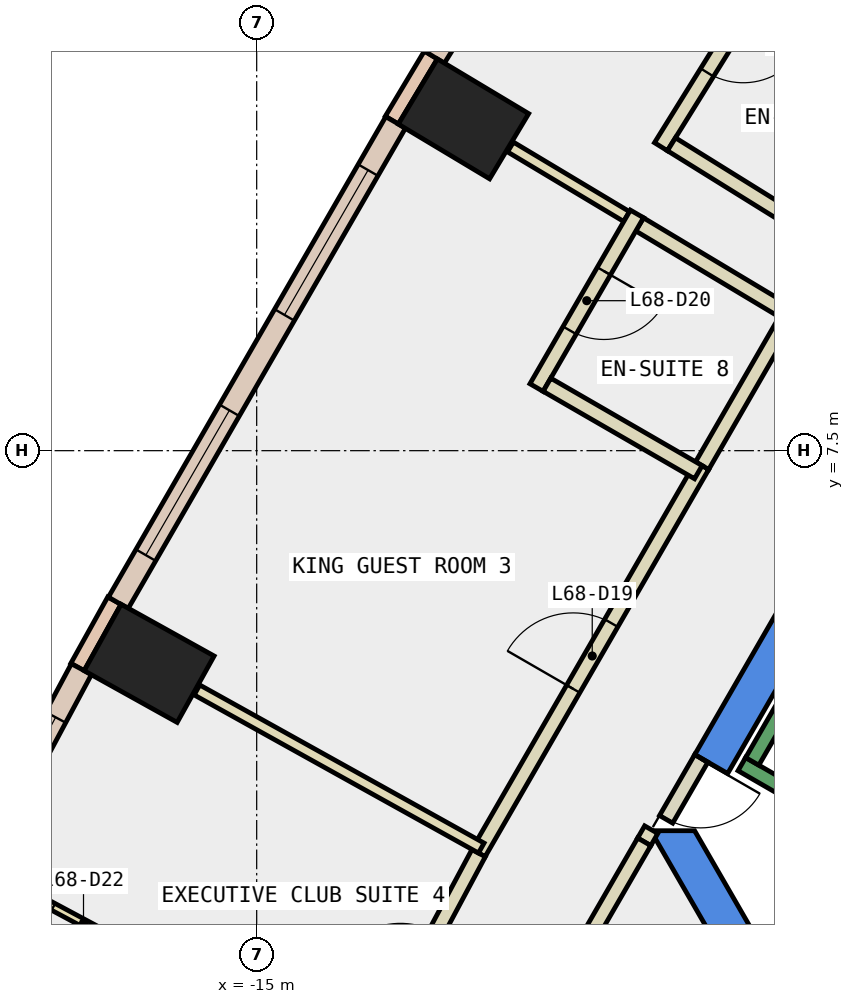
"""IFC4 building model, lengths in metres.
Left out: names, types, materials, properties, quantities, classifications, styles, units other than length and angle.
Written with IfcOpenShell. Run it as: python <this file> out.ifc"""

import sys

from ifc_helpers import new_model, si_unit, direction, frame, frame_2d, origin, origin_2d, place, context, subcontext, project, spatial, polyline, rectangle, outline, extrude, element, fill, save


model = new_model("IFC4")
c1 = context("Model", 3, precision=1e-05, world=origin(), true_north=direction((0.0, 1.0)))
c2 = subcontext(c1, "Body", "Model", "MODEL_VIEW")
j1 = project(units=[si_unit("LENGTHUNIT", "METRE"), si_unit("PLANEANGLEUNIT", "RADIAN")], contexts=[c1])
p1 = place(None, origin())
s1 = spatial("IfcSite", under=j1, at=p1, CompositionType="ELEMENT")
p2 = place(p1, origin())
s2 = spatial("IfcBuilding", under=s1, at=p2, CompositionType="ELEMENT")
p3 = place(p2, frame((0.0, 0.0, 293.6)))
s3 = spatial("IfcBuildingStorey", under=s2, at=p3, CompositionType="ELEMENT", Elevation=293.6)
for number, where, z_axis, x_axis in (
    (1, (-12.279, 11.865, -0.34), (0.0, 0.0, 1.0), (0.514, 0.858, 0.0)),
    (2, (-16.415, 4.702, -0.34), (0.0, 0.0, 1.0), (0.486, 0.874, 0.0)),
):
    element("IfcColumn", number, at=place(p3, frame(where, z_axis=z_axis, x_axis=x_axis)), inside=s3, PredefinedType="COLUMN", context=c2, shape_type="SweptSolid", body=[
        extrude(rectangle(XDim=1.0, YDim=1.4, at=origin_2d()), origin(), (0.0, 0.0, 1.0), 3.6),
    ])
p4 = place(p3, frame((0.0, 0.0, -0.34)))
e3 = element("IfcWall", 3, at=p4, inside=s3, PredefinedType="SHEAR", context=c2, shape_type="SweptSolid", body=[
    extrude(outline(polyline([(-9.236, 3.502), (-8.803, 3.253), (-4.619, 10.5), (-4.907, 11.0), (-9.236, 3.502)])), origin(), (0.0, 0.0, 1.0), 3.6),
])
p5 = place(p3, frame((0.0, 0.0, -0.34)))
e4 = element("IfcWall", 4, at=p5, inside=s3, PredefinedType="SHEAR", context=c2, shape_type="SweptSolid", body=[
    extrude(outline(polyline([(-9.815, 2.5), (-4.907, -6.0), (-4.619, -5.5), (-9.238, 2.5), (-9.815, 2.5)])), origin(), (0.0, 0.0, 1.0), 3.6),
])
p6 = place(p3, frame((-12.708, 12.706, 0.0), z_axis=(0.0, 0.0, 1.0), x_axis=(-0.513777707721, -0.857923345672, 0.0)))
e5 = element("IfcWall", 5, at=p6, inside=s3, PredefinedType="STANDARD", context=c2, shape_type="SweptSolid", body=[
    extrude(rectangle(XDim=1.0, YDim=0.2, at=frame_2d((0.5, 0.0))), origin(), (0.0, 0.0, 1.0), 3.26),
])
p7 = place(p3, frame((-16.872, 5.527, 0.0), z_axis=(0.0, 0.0, 1.0), x_axis=(-0.485850211157, -0.874042088414, 0.0)))
e6 = element("IfcWall", 6, at=p7, inside=s3, PredefinedType="STANDARD", context=c2, shape_type="SweptSolid", body=[
    extrude(rectangle(XDim=1.0, YDim=0.2, at=frame_2d((0.5, 0.0))), origin(), (0.0, 0.0, 1.0), 3.26),
])
p8 = place(p3, frame((-8.819, 18.855, 0.0), z_axis=(0.0, 0.0, 1.0), x_axis=(-0.527762071678, -0.849392250788, 0.0)))
e7 = element("IfcWall", 7, at=p8, inside=s3, PredefinedType="STANDARD", context=c2, shape_type="SweptSolid", body=[
    extrude(rectangle(XDim=7.276, YDim=0.3, at=frame_2d((3.638, 0.0))), origin(), (0.0, 0.0, 1.0), 3.26),
])
p9 = place(p8, frame((0.719, 0.0, 0.9)))
e8 = element("IfcOpeningElement", 8, at=p9, cuts=e7, PredefinedType="OPENING", context=c2, shape_type="SweptSolid", body=[
    extrude(rectangle(XDim=2.2, YDim=2.0, at=frame_2d((1.1, 1.0))), frame((0.0, 0.16, 0.0), z_axis=(0.0, -1.0, 0.0), x_axis=(1.0, 0.0, 0.0)), (0.0, 0.0, 1.0), 0.32),
])
p10 = place(p8, frame((4.357, 0.0, 0.9)))
e9 = element("IfcOpeningElement", 9, at=p10, cuts=e7, PredefinedType="OPENING", context=c2, shape_type="SweptSolid", body=[
    extrude(rectangle(XDim=2.2, YDim=2.0, at=frame_2d((1.1, 1.0))), frame((0.0, 0.16, 0.0), z_axis=(0.0, -1.0, 0.0), x_axis=(1.0, 0.0, 0.0)), (0.0, 0.0, 1.0), 0.32),
])
p11 = place(p3, frame((-13.172, 11.819, 0.0), z_axis=(0.0, 0.0, 1.0), x_axis=(-0.499945412946, -0.866056917341, 0.0)))
e10 = element("IfcWall", 10, at=p11, inside=s3, PredefinedType="STANDARD", context=c2, shape_type="SweptSolid", body=[
    extrude(rectangle(XDim=7.299, YDim=0.3, at=frame_2d((3.649, 0.0))), origin(), (0.0, 0.0, 1.0), 3.26),
])
p12 = place(p11, frame((0.725, 0.0, 0.9)))
e11 = element("IfcOpeningElement", 11, at=p12, cuts=e10, PredefinedType="OPENING", context=c2, shape_type="SweptSolid", body=[
    extrude(rectangle(XDim=2.2, YDim=2.0, at=frame_2d((1.1, 1.0))), frame((0.0, 0.16, 0.0), z_axis=(0.0, -1.0, 0.0), x_axis=(1.0, 0.0, 0.0)), (0.0, 0.0, 1.0), 0.32),
])
p13 = place(p11, frame((4.374, 0.0, 0.9)))
e12 = element("IfcOpeningElement", 12, at=p13, cuts=e10, PredefinedType="OPENING", context=c2, shape_type="SweptSolid", body=[
    extrude(rectangle(XDim=2.2, YDim=2.0, at=frame_2d((1.1, 1.0))), frame((0.0, 0.16, 0.0), z_axis=(0.0, -1.0, 0.0), x_axis=(1.0, 0.0, 0.0)), (0.0, 0.0, 1.0), 0.32),
])
p14 = place(p3, frame((-17.306, 4.626, 0.0), z_axis=(0.0, 0.0, 1.0), x_axis=(-0.471789353675, -0.881711293882, 0.0)))
e13 = element("IfcWall", 13, at=p14, inside=s3, PredefinedType="STANDARD", context=c2, shape_type="SweptSolid", body=[
    extrude(rectangle(XDim=7.277, YDim=0.3, at=frame_2d((3.638, 0.0))), origin(), (0.0, 0.0, 1.0), 3.26),
])
p15 = place(p14, frame((0.719, 0.0, 0.9)))
e14 = element("IfcOpeningElement", 14, at=p15, cuts=e13, PredefinedType="OPENING", context=c2, shape_type="SweptSolid", body=[
    extrude(rectangle(XDim=2.2, YDim=2.0, at=frame_2d((1.1, 1.0))), frame((0.0, 0.16, 0.0), z_axis=(0.0, -1.0, 0.0), x_axis=(1.0, 0.0, 0.0)), (0.0, 0.0, 1.0), 0.32),
])
p16 = place(p14, frame((4.358, 0.0, 0.9)))
e15 = element("IfcOpeningElement", 15, at=p16, cuts=e13, PredefinedType="OPENING", context=c2, shape_type="SweptSolid", body=[
    extrude(rectangle(XDim=2.2, YDim=2.0, at=frame_2d((1.1, 1.0))), frame((0.0, 0.16, 0.0), z_axis=(0.0, -1.0, 0.0), x_axis=(1.0, 0.0, 0.0)), (0.0, 0.0, 1.0), 0.32),
])
p17 = place(p3, frame((-9.809, 2.514, 0.0), z_axis=(0.0, 0.0, 1.0), x_axis=(-0.497849076449, -0.867263683708, 0.0)))
e16 = element("IfcWall", 16, at=p17, inside=s3, PredefinedType="PARTITIONING", context=c2, shape_type="SweptSolid", body=[
    extrude(rectangle(XDim=0.184, YDim=0.2, at=frame_2d((0.092, 0.0))), origin(), (0.0, 0.0, 1.0), 2.4),
])
p18 = place(p3, frame((-12.082, 2.207, 0.0), z_axis=(0.0, 0.0, 1.0), x_axis=(0.500123454404, 0.865954115618, 0.0)))
e17 = element("IfcWall", 17, at=p18, inside=s3, PredefinedType="PARTITIONING", context=c2, shape_type="SweptSolid", body=[
    extrude(rectangle(XDim=5.885, YDim=0.2, at=frame_2d((2.942, 0.0))), origin(), (0.0, 0.0, 1.0), 3.26),
])
p19 = place(p18, frame((2.493, 0.0, 0.0)))
e18 = element("IfcOpeningElement", 18, at=p19, cuts=e17, PredefinedType="OPENING", context=c2, shape_type="SweptSolid", body=[
    extrude(rectangle(XDim=1.0, YDim=2.1, at=frame_2d((0.5, 1.05))), frame((0.0, 0.11, 0.0), z_axis=(0.0, -1.0, 0.0), x_axis=(1.0, 0.0, 0.0)), (0.0, 0.0, 1.0), 0.22),
])
p20 = place(p3, frame((-9.139, 7.303, 0.0), z_axis=(0.0, 0.0, 1.0), x_axis=(0.499869187296, 0.866100915363, 0.0)))
e19 = element("IfcWall", 19, at=p20, inside=s3, PredefinedType="PARTITIONING", context=c2, shape_type="SweptSolid", body=[
    extrude(rectangle(XDim=2.401, YDim=0.2, at=frame_2d((1.2, 0.0))), origin(), (0.0, 0.0, 1.0), 3.26),
])
p21 = place(p3, frame((-13.666, -0.76, 0.0), z_axis=(0.0, 0.0, 1.0), x_axis=(0.471643060173, 0.881789557543, 0.0)))
e20 = element("IfcWall", 20, at=p21, inside=s3, PredefinedType="PARTITIONING", context=c2, shape_type="SweptSolid", body=[
    extrude(rectangle(XDim=3.363, YDim=0.2, at=frame_2d((1.681, 0.0))), origin(), (0.0, 0.0, 1.0), 3.26),
])
p22 = place(p21, frame((1.181, 0.0, 0.0)))
e21 = element("IfcOpeningElement", 21, at=p22, cuts=e20, PredefinedType="OPENING", context=c2, shape_type="SweptSolid", body=[
    extrude(rectangle(XDim=1.0, YDim=2.1, at=frame_2d((0.5, 1.05))), frame((0.0, 0.11, 0.0), z_axis=(0.0, -1.0, 0.0), x_axis=(1.0, 0.0, 0.0)), (0.0, 0.0, 1.0), 0.22),
])
p23 = place(p3, frame((-7.992, 14.217, 0.0), z_axis=(0.0, 0.0, 1.0), x_axis=(-0.527795797674, -0.849371294522, 0.0)))
e22 = element("IfcWall", 22, at=p23, inside=s3, PredefinedType="PARTITIONING", context=c2, shape_type="SweptSolid", body=[
    extrude(rectangle(XDim=3.2, YDim=0.2, at=frame_2d((1.6, 0.0))), origin(), (0.0, 0.0, 1.0), 3.26),
])
p24 = place(p23, frame((1.15, 0.0, 0.0)))
e23 = element("IfcOpeningElement", 23, at=p24, cuts=e22, PredefinedType="OPENING", context=c2, shape_type="SweptSolid", body=[
    extrude(rectangle(XDim=0.9, YDim=2.1, at=frame_2d((0.45, 1.05))), frame((0.0, 0.11, 0.0), z_axis=(0.0, -1.0, 0.0), x_axis=(1.0, 0.0, 0.0)), (0.0, 0.0, 1.0), 0.22),
])
p25 = place(p3, frame((-9.543, 11.531, 0.0), z_axis=(0.0, 0.0, 1.0), x_axis=(0.849400119549, -0.527749407305, 0.0)))
e24 = element("IfcWall", 24, at=p25, inside=s3, PredefinedType="PARTITIONING", context=c2, shape_type="SweptSolid", body=[
    extrude(rectangle(XDim=2.5, YDim=0.2, at=frame_2d((1.25, 0.0))), origin(), (0.0, 0.0, 1.0), 3.26),
])
p26 = place(p3, frame((-10.133, 10.58, 0.0), z_axis=(0.0, 0.0, 1.0), x_axis=(-0.857903919212, 0.513810145287, 0.0)))
e25 = element("IfcWall", 25, at=p26, inside=s3, PredefinedType="PARTITIONING", context=c2, shape_type="SweptSolid", body=[
    extrude(rectangle(XDim=1.781, YDim=0.15, at=frame_2d((0.891, 0.0))), origin(), (0.0, 0.0, 1.0), 3.26),
])
p27 = place(p3, frame((-7.989, 9.295, 0.0), z_axis=(0.0, 0.0, 1.0), x_axis=(-0.857801856135, 0.513980520654, 0.0)))
e26 = element("IfcWall", 26, at=p27, inside=s3, PredefinedType="PARTITIONING", context=c2, shape_type="SweptSolid", body=[
    extrude(rectangle(XDim=2.3, YDim=0.2, at=frame_2d((1.15, 0.0))), origin(), (0.0, 0.0, 1.0), 3.26),
])
p28 = place(p3, frame((-9.997, 10.615, 0.0), z_axis=(0.0, 0.0, 1.0), x_axis=(-0.500525697837, -0.865721679182, 0.0)))
e27 = element("IfcWall", 27, at=p28, inside=s3, PredefinedType="PARTITIONING", context=c2, shape_type="SweptSolid", body=[
    extrude(rectangle(XDim=2.639, YDim=0.2, at=frame_2d((1.32, 0.0))), origin(), (0.0, 0.0, 1.0), 3.26),
])
p29 = place(p28, frame((0.869, 0.0, 0.0)))
e28 = element("IfcOpeningElement", 28, at=p29, cuts=e27, PredefinedType="OPENING", context=c2, shape_type="SweptSolid", body=[
    extrude(rectangle(XDim=0.9, YDim=2.1, at=frame_2d((0.45, 1.05))), frame((0.0, 0.11, 0.0), z_axis=(0.0, -1.0, 0.0), x_axis=(1.0, 0.0, 0.0)), (0.0, 0.0, 1.0), 0.22),
])
p30 = place(p3, frame((-11.181, 8.367, 0.0), z_axis=(0.0, 0.0, 1.0), x_axis=(0.866053019151, -0.499952165731, 0.0)))
e29 = element("IfcWall", 29, at=p30, inside=s3, PredefinedType="PARTITIONING", context=c2, shape_type="SweptSolid", body=[
    extrude(rectangle(XDim=2.3, YDim=0.2, at=frame_2d((1.15, 0.0))), origin(), (0.0, 0.0, 1.0), 3.26),
])
p31 = place(p3, frame((-12.045, 2.272, 0.0), z_axis=(0.0, 0.0, 1.0), x_axis=(-0.873982340973, 0.485957680943, 0.0)))
e30 = element("IfcWall", 30, at=p31, inside=s3, PredefinedType="PARTITIONING", context=c2, shape_type="SweptSolid", body=[
    extrude(rectangle(XDim=4.28, YDim=0.15, at=frame_2d((2.14, 0.0))), origin(), (0.0, 0.0, 1.0), 3.26),
])
p32 = place(p3, frame((-16.0, 0.602, 0.0), z_axis=(0.0, 0.0, 1.0), x_axis=(-0.881743923375, 0.47172836844, 0.0)))
e31 = element("IfcWall", 31, at=p32, inside=s3, PredefinedType="PARTITIONING", context=c2, shape_type="SweptSolid", body=[
    extrude(rectangle(XDim=2.9, YDim=0.1, at=frame_2d((1.45, 0.0))), origin(), (0.0, 0.0, 1.0), 3.26),
])
p33 = place(p32, frame((1.0, 0.0, 0.0)))
e32 = element("IfcOpeningElement", 32, at=p33, cuts=e31, PredefinedType="OPENING", context=c2, shape_type="SweptSolid", body=[
    extrude(rectangle(XDim=0.9, YDim=2.1, at=frame_2d((0.45, 1.05))), frame((0.0, 0.06, 0.0), z_axis=(0.0, -1.0, 0.0), x_axis=(1.0, 0.0, 0.0)), (0.0, 0.0, 1.0), 0.12),
])
p34 = place(p3, frame((-9.15, 3.452, 0.0), z_axis=(0.0, 0.0, 1.0), x_axis=(-0.500079945886, -0.865979242085, 0.0)))
e33 = element("IfcWall", 33, at=p34, inside=s3, PredefinedType="PARTITIONING", context=c2, shape_type="SweptSolid", body=[
    extrude(rectangle(XDim=0.926, YDim=0.2, at=frame_2d((0.463, 0.0))), origin(), (0.0, 0.0, 1.0), 2.4),
])
p35 = place(p34, frame((0.017, 0.0, 0.0)))
e34 = element("IfcOpeningElement", 34, at=p35, cuts=e33, PredefinedType="OPENING", context=c2, shape_type="SweptSolid", body=[
    extrude(rectangle(XDim=0.9, YDim=2.1, at=frame_2d((0.45, 1.05))), frame((0.0, 0.11, 0.0), z_axis=(0.0, -1.0, 0.0), x_axis=(1.0, 0.0, 0.0)), (0.0, 0.0, 1.0), 0.22),
])
p36 = place(p3, frame((-9.901, 2.354, 0.0), z_axis=(0.0, 0.0, 1.0), x_axis=(-0.500374498448, -0.865809079014, 0.0)))
e35 = element("IfcWall", 35, at=p36, inside=s3, PredefinedType="PARTITIONING", context=c2, shape_type="SweptSolid", body=[
    extrude(rectangle(XDim=1.469, YDim=0.2, at=frame_2d((0.734, 0.0))), origin(), (0.0, 0.0, 1.0), 3.26),
])
p37 = place(p3, frame((-6.25, 2.01, 0.0), z_axis=(0.0, 0.0, 1.0), x_axis=(-0.86611865017, 0.499838457731, 0.0)))
e36 = element("IfcWall", 36, at=p37, inside=s3, PredefinedType="STANDARD", context=c2, shape_type="SweptSolid", body=[
    extrude(rectangle(XDim=2.733, YDim=0.2, at=frame_2d((1.366, 0.0))), origin(), (0.0, 0.0, 1.0), 3.26),
])
p38 = place(p3, frame((-5.03, 9.388, 0.0), z_axis=(0.0, 0.0, 1.0), x_axis=(-0.499978703459, -0.866037698999, 0.0)))
e37 = element("IfcWall", 37, at=p38, inside=s3, PredefinedType="STANDARD", context=c2, shape_type="SweptSolid", body=[
    extrude(rectangle(XDim=6.9, YDim=0.2, at=frame_2d((3.45, 0.0))), origin(), (0.0, 0.0, 1.0), 3.26),
])
p39 = place(p12, origin())
e38 = element("IfcWindow", 38, at=p39, inside=s3, PartitioningType="SINGLE_PANEL", PredefinedType="WINDOW", context=c2, shape_type="SweptSolid", body=[
    extrude(rectangle(XDim=2.2, YDim=2.0, at=frame_2d((1.1, 1.0))), frame((0.0, 0.03, 0.0), z_axis=(0.0, -1.0, 0.0), x_axis=(1.0, 0.0, 0.0)), (0.0, 0.0, 1.0), 0.06),
])
fill(e11, e38)
p40 = place(p13, origin())
e39 = element("IfcWindow", 39, at=p40, inside=s3, PartitioningType="SINGLE_PANEL", PredefinedType="WINDOW", context=c2, shape_type="SweptSolid", body=[
    extrude(rectangle(XDim=2.2, YDim=2.0, at=frame_2d((1.1, 1.0))), frame((0.0, 0.03, 0.0), z_axis=(0.0, -1.0, 0.0), x_axis=(1.0, 0.0, 0.0)), (0.0, 0.0, 1.0), 0.06),
])
fill(e12, e39)
p41 = place(p15, origin())
e40 = element("IfcWindow", 40, at=p41, inside=s3, PartitioningType="SINGLE_PANEL", PredefinedType="WINDOW", context=c2, shape_type="SweptSolid", body=[
    extrude(rectangle(XDim=2.2, YDim=2.0, at=frame_2d((1.1, 1.0))), frame((0.0, 0.03, 0.0), z_axis=(0.0, -1.0, 0.0), x_axis=(1.0, 0.0, 0.0)), (0.0, 0.0, 1.0), 0.06),
])
fill(e14, e40)
p42 = place(p24, origin())
e41 = element("IfcDoor", 41, at=p42, inside=s3, OperationType="SINGLE_SWING_LEFT", PredefinedType="DOOR", context=c2, shape_type="SweptSolid", body=[
    extrude(rectangle(XDim=0.9, YDim=2.1, at=frame_2d((0.45, 1.05))), frame((0.0, 0.025, 0.0), z_axis=(0.0, -1.0, 0.0), x_axis=(1.0, 0.0, 0.0)), (0.0, 0.0, 1.0), 0.05),
])
fill(e23, e41)
p43 = place(p19, origin())
e42 = element("IfcDoor", 42, at=p43, inside=s3, OperationType="SINGLE_SWING_LEFT", PredefinedType="DOOR", context=c2, shape_type="SweptSolid", body=[
    extrude(rectangle(XDim=1.0, YDim=2.1, at=frame_2d((0.5, 1.05))), frame((0.0, 0.025, 0.0), z_axis=(0.0, -1.0, 0.0), x_axis=(1.0, 0.0, 0.0)), (0.0, 0.0, 1.0), 0.05),
])
fill(e18, e42)
p44 = place(p29, origin())
e43 = element("IfcDoor", 43, at=p44, inside=s3, OperationType="SINGLE_SWING_LEFT", PredefinedType="DOOR", context=c2, shape_type="SweptSolid", body=[
    extrude(rectangle(XDim=0.9, YDim=2.1, at=frame_2d((0.45, 1.05))), frame((0.0, 0.025, 0.0), z_axis=(0.0, -1.0, 0.0), x_axis=(1.0, 0.0, 0.0)), (0.0, 0.0, 1.0), 0.05),
])
fill(e28, e43)
p45 = place(p33, origin())
e44 = element("IfcDoor", 44, at=p45, inside=s3, OperationType="SINGLE_SWING_LEFT", PredefinedType="DOOR", context=c2, shape_type="SweptSolid", body=[
    extrude(rectangle(XDim=0.9, YDim=2.1, at=frame_2d((0.45, 1.05))), frame((0.0, 0.025, 0.0), z_axis=(0.0, -1.0, 0.0), x_axis=(1.0, 0.0, 0.0)), (0.0, 0.0, 1.0), 0.05),
])
fill(e32, e44)
p46 = place(p35, origin())
e45 = element("IfcDoor", 45, at=p46, inside=s3, OperationType="SINGLE_SWING_LEFT", PredefinedType="DOOR", context=c2, shape_type="SweptSolid", body=[
    extrude(rectangle(XDim=0.9, YDim=2.1, at=frame_2d((0.45, 1.05))), frame((0.0, 0.025, 0.0), z_axis=(0.0, -1.0, 0.0), x_axis=(1.0, 0.0, 0.0)), (0.0, 0.0, 1.0), 0.05),
])
fill(e34, e45)
save(model, sys.argv[1])
